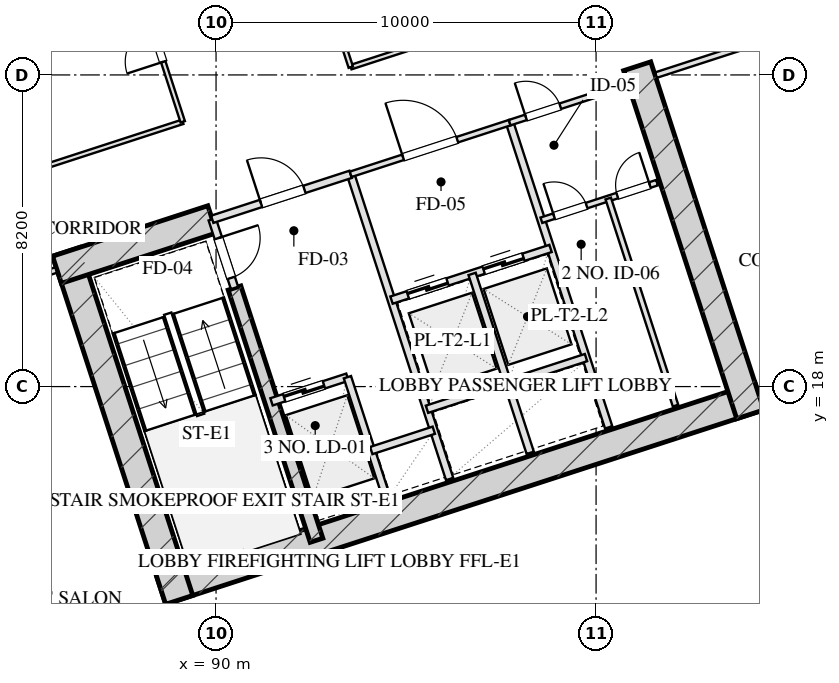
"""IFC4 building model, lengths in metres.
Left out: names, types, materials, properties, quantities, classifications, styles, units other than length and angle.
Written with IfcOpenShell. Run it as: python <this file> out.ifc"""

import sys

from ifc_helpers import new_model, si_unit, direction, frame, frame_2d, origin, place, context, subcontext, project, spatial, rectangle, extrude, element, fill, save


model = new_model("IFC4")
c1 = context("Model", 3, precision=1e-05, world=origin(), true_north=direction((0.0, 1.0)))
c2 = subcontext(c1, "Body", "Model", "MODEL_VIEW")
j1 = project(units=[si_unit("LENGTHUNIT", "METRE"), si_unit("PLANEANGLEUNIT", "RADIAN")], contexts=[c1])
p1 = place(None, origin())
s1 = spatial("IfcSite", under=j1, at=p1, CompositionType="ELEMENT")
p2 = place(p1, origin())
s2 = spatial("IfcBuilding", under=s1, at=p2, CompositionType="ELEMENT")
p3 = place(p2, frame((0.0, 0.0, 54.05)))
s3 = spatial("IfcBuildingStorey", under=s2, at=p3, CompositionType="ELEMENT", Elevation=54.05)
p4 = place(p3, frame((88.559, 12.629, 0.0), z_axis=(0.0, 0.0, 1.0), x_axis=(0.951056072937, 0.309018358888, 0.0)))
e1 = element("IfcWall", 1, at=p4, inside=s3, PredefinedType="SHEAR", context=c2, shape_type="SweptSolid", body=[
    extrude(rectangle(XDim=16.55, YDim=0.75, at=frame_2d((8.275, 0.0))), origin(), (0.0, 0.0, 1.0), 3.45),
])
p5 = place(p3, frame((86.055, 21.546, 0.0), z_axis=(0.0, 0.0, 1.0), x_axis=(0.309023585745, -0.951054374604, 0.0)))
e2 = element("IfcWall", 2, at=p5, inside=s3, PredefinedType="SHEAR", context=c2, shape_type="SweptSolid", body=[
    extrude(rectangle(XDim=9.63, YDim=0.75, at=frame_2d((4.815, 0.0))), origin(), (0.0, 0.0, 1.0), 3.45),
])
p6 = place(p3, frame((101.082, 26.429, 0.0), z_axis=(0.0, 0.0, 1.0), x_axis=(0.309016134813, -0.951056795583, 0.0)))
e3 = element("IfcWall", 3, at=p6, inside=s3, PredefinedType="SHEAR", context=c2, shape_type="SweptSolid", body=[
    extrude(rectangle(XDim=9.63, YDim=0.75, at=frame_2d((4.815, 0.0))), origin(), (0.0, 0.0, 1.0), 3.45),
])
p7 = place(p3, frame((90.486, 20.594, 0.0), z_axis=(0.0, 0.0, 1.0), x_axis=(0.309020428229, -0.951055400562, 0.0)))
e4 = element("IfcWall", 4, at=p7, inside=s3, PredefinedType="SHEAR", context=c2, shape_type="SweptSolid", body=[
    extrude(rectangle(XDim=6.98, YDim=0.35, at=frame_2d((3.49, 0.0))), origin(), (0.0, 0.0, 1.0), 3.45),
])
p8 = place(p3, frame((85.814, 21.074, 0.0), z_axis=(0.0, 0.0, 1.0), x_axis=(0.95106580992, 0.308988390074, 0.0)))
e5 = element("IfcWall", 5, at=p8, inside=s3, PredefinedType="SHEAR", context=c2, shape_type="SweptSolid", body=[
    extrude(rectangle(XDim=4.295, YDim=0.75, at=frame_2d((2.147, 0.0))), origin(), (0.0, 0.0, 1.0), 3.45),
])
p9 = place(p3, frame((100.345, 63.648, 0.0), z_axis=(0.0, 0.0, 1.0), x_axis=(0.309014526607, -0.951057318118, 0.0)))
e6 = element("IfcWall", 6, at=p9, inside=s3, PredefinedType="SOLIDWALL", context=c2, shape_type="SweptSolid", body=[
    extrude(rectangle(XDim=50.0, YDim=0.4, at=frame_2d((25.0, 0.0))), origin(), (0.0, 0.0, 1.0), 2.61),
])
p10 = place(p3, frame((113.998, 12.567, 0.0), z_axis=(0.0, 0.0, 1.0), x_axis=(-0.951055939317, -0.309018770125, 0.0)))
e7 = element("IfcWall", 7, at=p10, inside=s3, PredefinedType="SOLIDWALL", context=c2, shape_type="SweptSolid", body=[
    extrude(rectangle(XDim=32.4, YDim=0.4, at=frame_2d((16.2, 0.0))), origin(), (0.0, 0.0, 1.0), 2.61),
])
p11 = place(p3, frame((89.899, 22.401, 0.0), z_axis=(0.0, 0.0, 1.0), x_axis=(0.308932062672, -0.951084108086, 0.0)))
e8 = element("IfcWall", 8, at=p11, inside=s3, PredefinedType="PARTITIONING", context=c2, shape_type="SweptSolid", body=[
    extrude(rectangle(XDim=1.9, YDim=0.2, at=frame_2d((0.95, 0.0))), origin(), (0.0, 0.0, 1.0), 3.175),
])
p12 = place(p11, frame((0.52, 0.0, 0.0)))
e9 = element("IfcOpeningElement", 9, at=p12, cuts=e8, PredefinedType="OPENING", context=c2, shape_type="SweptSolid", body=[
    extrude(rectangle(XDim=1.1, YDim=2.05, at=frame_2d((0.55, 1.025))), frame((0.0, 0.11, 0.0), z_axis=(0.0, -1.0, 0.0), x_axis=(1.0, 0.0, 0.0)), (0.0, 0.0, 1.0), 0.22),
])
p13 = place(p3, frame((93.542, 23.585, 0.0), z_axis=(0.0, 0.0, 1.0), x_axis=(0.309042196757, -0.951048327176, 0.0)))
e10 = element("IfcWall", 10, at=p13, inside=s3, PredefinedType="PARTITIONING", context=c2, shape_type="SweptSolid", body=[
    extrude(rectangle(XDim=8.43, YDim=0.2, at=frame_2d((4.215, 0.0))), origin(), (0.0, 0.0, 1.0), 3.175),
])
p14 = place(p3, frame((89.899, 22.401, 0.0), z_axis=(0.0, 0.0, 1.0), x_axis=(0.951046716504, 0.309047153403, 0.0)))
e11 = element("IfcWall", 11, at=p14, inside=s3, PredefinedType="PARTITIONING", context=c2, shape_type="SweptSolid", body=[
    extrude(rectangle(XDim=3.83, YDim=0.2, at=frame_2d((1.915, 0.0))), origin(), (0.0, 0.0, 1.0), 3.175),
])
p15 = place(p14, frame((1.35, 0.0, 0.0)))
e12 = element("IfcOpeningElement", 12, at=p15, cuts=e11, PredefinedType="OPENING", context=c2, shape_type="SweptSolid", body=[
    extrude(rectangle(XDim=1.2, YDim=2.05, at=frame_2d((0.6, 1.025))), frame((0.0, 0.11, 0.0), z_axis=(0.0, -1.0, 0.0), x_axis=(1.0, 0.0, 0.0)), (0.0, 0.0, 1.0), 0.22),
])
p16 = place(p3, frame((91.46, 17.598, 0.0), z_axis=(0.0, 0.0, 1.0), x_axis=(0.951062257173, 0.308999325213, 0.0)))
e13 = element("IfcWall", 13, at=p16, inside=s3, PredefinedType="PARTITIONING", context=c2, shape_type="SweptSolid", body=[
    extrude(rectangle(XDim=2.1, YDim=0.2, at=frame_2d((1.05, 0.0))), origin(), (0.0, 0.0, 1.0), 3.175),
])
p17 = place(p16, frame((0.35, 0.0, 0.0)))
e14 = element("IfcOpeningElement", 14, at=p17, cuts=e13, PredefinedType="OPENING", context=c2, shape_type="SweptSolid", body=[
    extrude(rectangle(XDim=1.1, YDim=2.05, at=frame_2d((0.55, 1.025))), frame((0.0, 0.11, 0.0), z_axis=(0.0, -1.0, 0.0), x_axis=(1.0, 0.0, 0.0)), (0.0, 0.0, 1.0), 0.22),
])
p18 = place(p3, frame((93.457, 18.247, 0.0), z_axis=(0.0, 0.0, 1.0), x_axis=(0.3089935693, -0.951064127245, 0.0)))
e15 = element("IfcWall", 15, at=p18, inside=s3, PredefinedType="PARTITIONING", context=c2, shape_type="SweptSolid", body=[
    extrude(rectangle(XDim=3.7, YDim=0.2, at=frame_2d((1.85, 0.0))), origin(), (0.0, 0.0, 1.0), 3.175),
])
p19 = place(p3, frame((94.084, 16.317, 0.0), z_axis=(0.0, 0.0, 1.0), x_axis=(0.951041328149, 0.309063734775, 0.0)))
e16 = element("IfcWall", 16, at=p19, inside=s3, PredefinedType="PARTITIONING", context=c2, shape_type="SweptSolid", body=[
    extrude(rectangle(XDim=1.73, YDim=0.2, at=frame_2d((0.865, 0.0))), origin(), (0.0, 0.0, 1.0), 3.175),
])
p20 = place(p3, frame((97.727, 24.944, 0.0), z_axis=(0.0, 0.0, 1.0), x_axis=(0.309016001439, -0.951056838919, 0.0)))
e17 = element("IfcWall", 17, at=p20, inside=s3, PredefinedType="PARTITIONING", context=c2, shape_type="SweptSolid", body=[
    extrude(rectangle(XDim=8.43, YDim=0.2, at=frame_2d((4.215, 0.0))), origin(), (0.0, 0.0, 1.0), 3.175),
])
p21 = place(p3, frame((93.542, 23.585, 0.0), z_axis=(0.0, 0.0, 1.0), x_axis=(0.951063829732, 0.308994485023, 0.0)))
e18 = element("IfcWall", 18, at=p21, inside=s3, PredefinedType="PARTITIONING", context=c2, shape_type="SweptSolid", body=[
    extrude(rectangle(XDim=4.4, YDim=0.15, at=frame_2d((2.2, 0.0))), origin(), (0.0, 0.0, 1.0), 3.175),
])
p22 = place(p21, frame((1.45, 0.0, 0.0)))
e19 = element("IfcOpeningElement", 19, at=p22, cuts=e18, PredefinedType="OPENING", context=c2, shape_type="SweptSolid", body=[
    extrude(rectangle(XDim=1.5, YDim=2.05, at=frame_2d((0.75, 1.025))), frame((0.0, 0.085, 0.0), z_axis=(0.0, -1.0, 0.0), x_axis=(1.0, 0.0, 0.0)), (0.0, 0.0, 1.0), 0.17),
])
p23 = place(p3, frame((94.617, 20.275, 0.0), z_axis=(0.0, 0.0, 1.0), x_axis=(0.951058531764, 0.30901079133, 0.0)))
e20 = element("IfcWall", 20, at=p23, inside=s3, PredefinedType="PARTITIONING", context=c2, shape_type="SweptSolid", body=[
    extrude(rectangle(XDim=4.4, YDim=0.2, at=frame_2d((2.2, 0.0))), origin(), (0.0, 0.0, 1.0), 3.175),
])
p24 = place(p23, frame((0.45, 0.0, 0.0)))
e21 = element("IfcOpeningElement", 21, at=p24, cuts=e20, PredefinedType="OPENING", context=c2, shape_type="SweptSolid", body=[
    extrude(rectangle(XDim=1.1, YDim=2.05, at=frame_2d((0.55, 1.025))), frame((0.0, 0.11, 0.0), z_axis=(0.0, -1.0, 0.0), x_axis=(1.0, 0.0, 0.0)), (0.0, 0.0, 1.0), 0.22),
])
p25 = place(p23, frame((2.55, 0.0, 0.0)))
e22 = element("IfcOpeningElement", 22, at=p25, cuts=e20, PredefinedType="OPENING", context=c2, shape_type="SweptSolid", body=[
    extrude(rectangle(XDim=1.1, YDim=2.05, at=frame_2d((0.55, 1.025))), frame((0.0, 0.11, 0.0), z_axis=(0.0, -1.0, 0.0), x_axis=(1.0, 0.0, 0.0)), (0.0, 0.0, 1.0), 0.22),
])
p26 = place(p3, frame((96.738, 20.964, 0.0), z_axis=(0.0, 0.0, 1.0), x_axis=(0.309042578481, -0.951048203135, 0.0)))
e23 = element("IfcWall", 23, at=p26, inside=s3, PredefinedType="PARTITIONING", context=c2, shape_type="SweptSolid", body=[
    extrude(rectangle(XDim=4.95, YDim=0.2, at=frame_2d((2.475, 0.0))), origin(), (0.0, 0.0, 1.0), 3.175),
])
p27 = place(p3, frame((95.551, 17.403, 0.0), z_axis=(0.0, 0.0, 1.0), x_axis=(0.951058531764, 0.30901079133, 0.0)))
e24 = element("IfcWall", 24, at=p27, inside=s3, PredefinedType="PARTITIONING", context=c2, shape_type="SweptSolid", body=[
    extrude(rectangle(XDim=4.4, YDim=0.2, at=frame_2d((2.2, 0.0))), origin(), (0.0, 0.0, 1.0), 3.175),
])
p28 = place(p3, frame((97.727, 24.944, 0.0), z_axis=(0.0, 0.0, 1.0), x_axis=(0.951036872128, 0.309077446369, 0.0)))
e25 = element("IfcWall", 25, at=p28, inside=s3, PredefinedType="PARTITIONING", context=c2, shape_type="SweptSolid", body=[
    extrude(rectangle(XDim=3.2, YDim=0.15, at=frame_2d((1.6, 0.0))), origin(), (0.0, 0.0, 1.0), 3.175),
])
p29 = place(p28, frame((0.45, 0.0, 0.0)))
e26 = element("IfcOpeningElement", 26, at=p29, cuts=e25, PredefinedType="OPENING", context=c2, shape_type="SweptSolid", body=[
    extrude(rectangle(XDim=0.95, YDim=2.05, at=frame_2d((0.475, 1.025))), frame((0.0, 0.085, 0.0), z_axis=(0.0, -1.0, 0.0), x_axis=(1.0, 0.0, 0.0)), (0.0, 0.0, 1.0), 0.17),
])
p30 = place(p3, frame((98.561, 22.376, 0.0), z_axis=(0.0, 0.0, 1.0), x_axis=(0.95104415986, 0.309055020985, 0.0)))
e27 = element("IfcWall", 27, at=p30, inside=s3, PredefinedType="PARTITIONING", context=c2, shape_type="SweptSolid", body=[
    extrude(rectangle(XDim=3.2, YDim=0.15, at=frame_2d((1.6, 0.0))), origin(), (0.0, 0.0, 1.0), 3.175),
])
p31 = place(p30, frame((0.35, 0.0, 0.0)))
e28 = element("IfcOpeningElement", 28, at=p31, cuts=e27, PredefinedType="OPENING", context=c2, shape_type="SweptSolid", body=[
    extrude(rectangle(XDim=0.9, YDim=2.05, at=frame_2d((0.45, 1.025))), frame((0.0, 0.085, 0.0), z_axis=(0.0, -1.0, 0.0), x_axis=(1.0, 0.0, 0.0)), (0.0, 0.0, 1.0), 0.17),
])
p32 = place(p30, frame((2.1, 0.0, 0.0)))
e29 = element("IfcOpeningElement", 29, at=p32, cuts=e27, PredefinedType="OPENING", context=c2, shape_type="SweptSolid", body=[
    extrude(rectangle(XDim=0.9, YDim=2.05, at=frame_2d((0.45, 1.025))), frame((0.0, 0.085, 0.0), z_axis=(0.0, -1.0, 0.0), x_axis=(1.0, 0.0, 0.0)), (0.0, 0.0, 1.0), 0.17),
])
p33 = place(p3, frame((100.32, 22.948, 0.0), z_axis=(0.0, 0.0, 1.0), x_axis=(0.309035009867, -0.951050662518, 0.0)))
e30 = element("IfcWall", 30, at=p33, inside=s3, PredefinedType="PARTITIONING", context=c2, shape_type="SweptSolid", body=[
    extrude(rectangle(XDim=5.73, YDim=0.15, at=frame_2d((2.865, 0.0))), origin(), (0.0, 0.0, 1.0), 3.175),
])
p34 = place(p3, frame((75.519, 17.729, 0.0), z_axis=(0.0, 0.0, 1.0), x_axis=(0.951056658866, 0.309016555588, 0.0)))
e31 = element("IfcWall", 31, at=p34, inside=s3, PredefinedType="PARTITIONING", context=c2, shape_type="SweptSolid", body=[
    extrude(rectangle(XDim=10.8, YDim=0.15, at=frame_2d((5.4, 0.0))), origin(), (0.0, 0.0, 1.0), 3.175),
])
p35 = place(p34, frame((4.536, 0.0, 0.0)))
e32 = element("IfcOpeningElement", 32, at=p35, cuts=e31, PredefinedType="OPENING", context=c2, shape_type="SweptSolid", body=[
    extrude(rectangle(XDim=1.0, YDim=2.05, at=frame_2d((0.5, 1.025))), frame((0.0, 0.085, 0.0), z_axis=(0.0, -1.0, 0.0), x_axis=(1.0, 0.0, 0.0)), (0.0, 0.0, 1.0), 0.17),
])
p36 = place(p3, frame((101.578, 26.196, 0.0), z_axis=(0.0, 0.0, 1.0), x_axis=(0.951059043131, 0.309009217467, 0.0)))
e33 = element("IfcWall", 33, at=p36, inside=s3, PredefinedType="PARTITIONING", context=c2, shape_type="SweptSolid", body=[
    extrude(rectangle(XDim=10.2, YDim=0.15, at=frame_2d((5.1, 0.0))), origin(), (0.0, 0.0, 1.0), 3.175),
])
p37 = place(p36, frame((4.284, 0.0, 0.0)))
e34 = element("IfcOpeningElement", 34, at=p37, cuts=e33, PredefinedType="OPENING", context=c2, shape_type="SweptSolid", body=[
    extrude(rectangle(XDim=1.0, YDim=2.05, at=frame_2d((0.5, 1.025))), frame((0.0, 0.085, 0.0), z_axis=(0.0, -1.0, 0.0), x_axis=(1.0, 0.0, 0.0)), (0.0, 0.0, 1.0), 0.17),
])
p38 = place(p3, frame((74.691, 20.278, 0.0), z_axis=(0.0, 0.0, 1.0), x_axis=(0.951054756643, 0.309022409974, 0.0)))
e35 = element("IfcWall", 35, at=p38, inside=s3, PredefinedType="PARTITIONING", context=c2, shape_type="SweptSolid", body=[
    extrude(rectangle(XDim=15.175, YDim=0.12, at=frame_2d((7.587, 0.0))), origin(), (0.0, 0.0, 1.0), 3.175),
])
p39 = place(p3, frame((93.546, 26.404, 0.0), z_axis=(0.0, 0.0, 1.0), x_axis=(0.951058189574, 0.309011844505, 0.0)))
e36 = element("IfcWall", 36, at=p39, inside=s3, PredefinedType="PARTITIONING", context=c2, shape_type="SweptSolid", body=[
    extrude(rectangle(XDim=17.775, YDim=0.12, at=frame_2d((8.887, 0.0))), origin(), (0.0, 0.0, 1.0), 3.175),
])
p40 = place(p3, frame((89.124, 24.967, 0.0), z_axis=(0.0, 0.0, 1.0), x_axis=(-0.30901773025, 0.951056277195, 0.0)))
e37 = element("IfcWall", 37, at=p40, inside=s3, PredefinedType="PARTITIONING", context=c2, shape_type="SweptSolid", body=[
    extrude(rectangle(XDim=16.64, YDim=0.12, at=frame_2d((8.32, 0.0))), origin(), (0.0, 0.0, 1.0), 3.175),
])
p41 = place(p40, frame((1.66, 0.0, 0.0)))
e38 = element("IfcOpeningElement", 38, at=p41, cuts=e37, PredefinedType="OPENING", context=c2, shape_type="SweptSolid", body=[
    extrude(rectangle(XDim=1.0, YDim=2.05, at=frame_2d((0.5, 1.025))), frame((0.0, 0.07, 0.0), z_axis=(0.0, -1.0, 0.0), x_axis=(1.0, 0.0, 0.0)), (0.0, 0.0, 1.0), 0.14),
])
p42 = place(p40, frame((7.82, 0.0, 0.0)))
e39 = element("IfcOpeningElement", 39, at=p42, cuts=e37, PredefinedType="OPENING", context=c2, shape_type="SweptSolid", body=[
    extrude(rectangle(XDim=1.0, YDim=2.05, at=frame_2d((0.5, 1.025))), frame((0.0, 0.07, 0.0), z_axis=(0.0, -1.0, 0.0), x_axis=(1.0, 0.0, 0.0)), (0.0, 0.0, 1.0), 0.14),
])
p43 = place(p40, frame((13.98, 0.0, 0.0)))
e40 = element("IfcOpeningElement", 40, at=p43, cuts=e37, PredefinedType="OPENING", context=c2, shape_type="SweptSolid", body=[
    extrude(rectangle(XDim=1.0, YDim=2.05, at=frame_2d((0.5, 1.025))), frame((0.0, 0.07, 0.0), z_axis=(0.0, -1.0, 0.0), x_axis=(1.0, 0.0, 0.0)), (0.0, 0.0, 1.0), 0.14),
])
p44 = place(p3, frame((93.546, 26.404, 0.0), z_axis=(0.0, 0.0, 1.0), x_axis=(-0.309022042254, 0.951054876125, 0.0)))
e41 = element("IfcWall", 41, at=p44, inside=s3, PredefinedType="PARTITIONING", context=c2, shape_type="SweptSolid", body=[
    extrude(rectangle(XDim=16.64, YDim=0.12, at=frame_2d((8.32, 0.0))), origin(), (0.0, 0.0, 1.0), 3.175),
])
p45 = place(p44, frame((1.16, 0.0, 0.0)))
e42 = element("IfcOpeningElement", 42, at=p45, cuts=e41, PredefinedType="OPENING", context=c2, shape_type="SweptSolid", body=[
    extrude(rectangle(XDim=1.0, YDim=2.05, at=frame_2d((0.5, 1.025))), frame((0.0, 0.07, 0.0), z_axis=(0.0, -1.0, 0.0), x_axis=(1.0, 0.0, 0.0)), (0.0, 0.0, 1.0), 0.14),
])
p46 = place(p44, frame((4.72, 0.0, 0.0)))
e43 = element("IfcOpeningElement", 43, at=p46, cuts=e41, PredefinedType="OPENING", context=c2, shape_type="SweptSolid", body=[
    extrude(rectangle(XDim=1.0, YDim=2.05, at=frame_2d((0.5, 1.025))), frame((0.0, 0.07, 0.0), z_axis=(0.0, -1.0, 0.0), x_axis=(1.0, 0.0, 0.0)), (0.0, 0.0, 1.0), 0.14),
])
p47 = place(p44, frame((7.549, 0.0, 0.0)))
e44 = element("IfcOpeningElement", 44, at=p47, cuts=e41, PredefinedType="OPENING", context=c2, shape_type="SweptSolid", body=[
    extrude(rectangle(XDim=1.0, YDim=2.05, at=frame_2d((0.5, 1.025))), frame((0.0, 0.07, 0.0), z_axis=(0.0, -1.0, 0.0), x_axis=(1.0, 0.0, 0.0)), (0.0, 0.0, 1.0), 0.14),
])
p48 = place(p44, frame((10.148, 0.0, 0.0)))
e45 = element("IfcOpeningElement", 45, at=p48, cuts=e41, PredefinedType="OPENING", context=c2, shape_type="SweptSolid", body=[
    extrude(rectangle(XDim=1.05, YDim=2.05, at=frame_2d((0.525, 1.025))), frame((0.0, 0.07, 0.0), z_axis=(0.0, -1.0, 0.0), x_axis=(1.0, 0.0, 0.0)), (0.0, 0.0, 1.0), 0.14),
])
p49 = place(p44, frame((14.48, 0.0, 0.0)))
e46 = element("IfcOpeningElement", 46, at=p49, cuts=e41, PredefinedType="OPENING", context=c2, shape_type="SweptSolid", body=[
    extrude(rectangle(XDim=1.0, YDim=2.05, at=frame_2d((0.5, 1.025))), frame((0.0, 0.07, 0.0), z_axis=(0.0, -1.0, 0.0), x_axis=(1.0, 0.0, 0.0)), (0.0, 0.0, 1.0), 0.14),
])
p50 = place(p3, frame((73.356, 24.386, 0.0), z_axis=(0.0, 0.0, 1.0), x_axis=(0.951054756643, 0.309022409974, 0.0)))
e47 = element("IfcWall", 47, at=p50, inside=s3, PredefinedType="PARTITIONING", context=c2, shape_type="SweptSolid", body=[
    extrude(rectangle(XDim=15.175, YDim=0.12, at=frame_2d((7.587, 0.0))), origin(), (0.0, 0.0, 1.0), 3.175),
])
p51 = place(p12, origin())
e48 = element("IfcDoor", 48, at=p51, inside=s3, OperationType="SINGLE_SWING_LEFT", PredefinedType="DOOR", context=c2, shape_type="SweptSolid", body=[
    extrude(rectangle(XDim=1.1, YDim=2.05, at=frame_2d((0.55, 1.025))), frame((0.0, 0.025, 0.0), z_axis=(0.0, -1.0, 0.0), x_axis=(1.0, 0.0, 0.0)), (0.0, 0.0, 1.0), 0.05),
])
fill(e9, e48)
p52 = place(p15, origin())
e49 = element("IfcDoor", 49, at=p52, inside=s3, OperationType="SINGLE_SWING_LEFT", PredefinedType="DOOR", context=c2, shape_type="SweptSolid", body=[
    extrude(rectangle(XDim=1.2, YDim=2.05, at=frame_2d((0.6, 1.025))), frame((0.0, 0.025, 0.0), z_axis=(0.0, -1.0, 0.0), x_axis=(1.0, 0.0, 0.0)), (0.0, 0.0, 1.0), 0.05),
])
fill(e12, e49)
p53 = place(p17, origin())
e50 = element("IfcDoor", 50, at=p53, inside=s3, OperationType="DOUBLE_DOOR_SLIDING", PredefinedType="DOOR", context=c2, shape_type="SweptSolid", body=[
    extrude(rectangle(XDim=1.1, YDim=2.05, at=frame_2d((0.55, 1.025))), frame((0.0, 0.025, 0.0), z_axis=(0.0, -1.0, 0.0), x_axis=(1.0, 0.0, 0.0)), (0.0, 0.0, 1.0), 0.05),
])
fill(e14, e50)
p54 = place(p22, origin())
e51 = element("IfcDoor", 51, at=p54, inside=s3, OperationType="SINGLE_SWING_LEFT", PredefinedType="DOOR", context=c2, shape_type="SweptSolid", body=[
    extrude(rectangle(XDim=1.5, YDim=2.05, at=frame_2d((0.75, 1.025))), frame((0.0, 0.025, 0.0), z_axis=(0.0, -1.0, 0.0), x_axis=(1.0, 0.0, 0.0)), (0.0, 0.0, 1.0), 0.05),
])
fill(e19, e51)
p55 = place(p24, origin())
e52 = element("IfcDoor", 52, at=p55, inside=s3, OperationType="DOUBLE_DOOR_SLIDING", PredefinedType="DOOR", context=c2, shape_type="SweptSolid", body=[
    extrude(rectangle(XDim=1.1, YDim=2.05, at=frame_2d((0.55, 1.025))), frame((0.0, 0.025, 0.0), z_axis=(0.0, -1.0, 0.0), x_axis=(1.0, 0.0, 0.0)), (0.0, 0.0, 1.0), 0.05),
])
fill(e21, e52)
p56 = place(p25, origin())
e53 = element("IfcDoor", 53, at=p56, inside=s3, OperationType="DOUBLE_DOOR_SLIDING", PredefinedType="DOOR", context=c2, shape_type="SweptSolid", body=[
    extrude(rectangle(XDim=1.1, YDim=2.05, at=frame_2d((0.55, 1.025))), frame((0.0, 0.025, 0.0), z_axis=(0.0, -1.0, 0.0), x_axis=(1.0, 0.0, 0.0)), (0.0, 0.0, 1.0), 0.05),
])
fill(e22, e53)
p57 = place(p29, origin())
e54 = element("IfcDoor", 54, at=p57, inside=s3, OperationType="SINGLE_SWING_LEFT", PredefinedType="DOOR", context=c2, shape_type="SweptSolid", body=[
    extrude(rectangle(XDim=0.95, YDim=2.05, at=frame_2d((0.475, 1.025))), frame((0.0, 0.025, 0.0), z_axis=(0.0, -1.0, 0.0), x_axis=(1.0, 0.0, 0.0)), (0.0, 0.0, 1.0), 0.05),
])
fill(e26, e54)
p58 = place(p31, origin())
e55 = element("IfcDoor", 55, at=p58, inside=s3, OperationType="SINGLE_SWING_LEFT", PredefinedType="DOOR", context=c2, shape_type="SweptSolid", body=[
    extrude(rectangle(XDim=0.9, YDim=2.05, at=frame_2d((0.45, 1.025))), frame((0.0, 0.025, 0.0), z_axis=(0.0, -1.0, 0.0), x_axis=(1.0, 0.0, 0.0)), (0.0, 0.0, 1.0), 0.05),
])
fill(e28, e55)
p59 = place(p32, origin())
e56 = element("IfcDoor", 56, at=p59, inside=s3, OperationType="SINGLE_SWING_RIGHT", PredefinedType="DOOR", context=c2, shape_type="SweptSolid", body=[
    extrude(rectangle(XDim=0.9, YDim=2.05, at=frame_2d((0.45, 1.025))), frame((0.0, 0.025, 0.0), z_axis=(0.0, -1.0, 0.0), x_axis=(1.0, 0.0, 0.0)), (0.0, 0.0, 1.0), 0.05),
])
fill(e29, e56)
p60 = place(p41, origin())
e57 = element("IfcDoor", 57, at=p60, inside=s3, OperationType="SINGLE_SWING_LEFT", PredefinedType="DOOR", context=c2, shape_type="SweptSolid", body=[
    extrude(rectangle(XDim=1.0, YDim=2.05, at=frame_2d((0.5, 1.025))), frame((0.0, 0.025, 0.0), z_axis=(0.0, -1.0, 0.0), x_axis=(1.0, 0.0, 0.0)), (0.0, 0.0, 1.0), 0.05),
])
fill(e38, e57)
save(model, sys.argv[1])
